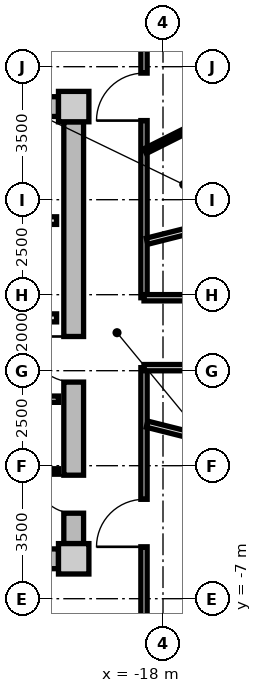
"""IFC4 building model, lengths in metres.
Left out: names, types, materials, properties, quantities, classifications, styles, units other than length and angle.
Written with IfcOpenShell. Run it as: python <this file> out.ifc"""

import sys

from ifc_helpers import new_model, si_unit, direction, frame, frame_2d, origin, origin_2d, place, context, subcontext, project, spatial, rectangle, extrude, source, transform, mapped, element, fill, save


model = new_model("IFC4")
c1 = context("Model", 3, precision=1e-05, world=origin(), true_north=direction((0.0, 1.0)))
c2 = subcontext(c1, "Body", "Model", "MODEL_VIEW")
j1 = project(units=[si_unit("LENGTHUNIT", "METRE"), si_unit("PLANEANGLEUNIT", "RADIAN")], contexts=[c1])
p1 = place(None, origin())
s1 = spatial("IfcSite", under=j1, at=p1, CompositionType="ELEMENT")
p2 = place(p1, origin())
s2 = spatial("IfcBuilding", under=s1, at=p2, CompositionType="ELEMENT")
p3 = place(p2, frame((0.0, 0.0, 210.85)))
s3 = spatial("IfcBuildingStorey", under=s2, at=p3, CompositionType="ELEMENT", Elevation=210.85)
m1 = source(origin(), c2, "Body", "SweptSolid", [
    extrude(rectangle(XDim=0.8, YDim=0.8, at=origin_2d()), origin(), (0.0, 0.0, 1.0), 3.05),
])
for number, where, z_axis, x_axis in (
    (1, (-20.35, -5.95, 0.0), (0.0, 0.0, 1.0), (1.0, 0.0, 0.0)),
    (2, (-20.35, 5.95, 0.0), (0.0, 0.0, 1.0), (1.0, 0.0, 0.0)),
):
    element("IfcColumn", number, at=place(p3, frame(where, z_axis=z_axis, x_axis=x_axis)), inside=s3, PredefinedType="COLUMN", context=c2, shape_type="MappedRepresentation", body=[
        mapped(m1, transform((0.0, 0.0, 0.0), x_axis=(1.0, 0.0, 0.0), y_axis=(0.0, 1.0, 0.0), z_axis=(0.0, 0.0, 1.0), scale=1.0)),
    ])
m2 = source(origin(), c2, "Body", "SweptSolid", [
    extrude(rectangle(XDim=14.5, YDim=0.52, at=frame_2d((7.25, 0.0))), origin(), (0.0, 0.0, 1.0), 2.76),
])
for number, where, z_axis, x_axis in (
    (3, (-35.25, 5.95, 0.0), (0.0, 0.0, 1.0), (1.0, 0.0, 0.0)),
    (4, (-20.75, -5.95, 0.0), (0.0, 0.0, 1.0), (-1.0, 0.0, 0.0)),
):
    element("IfcWall", number, at=place(p3, frame(where, z_axis=z_axis, x_axis=x_axis)), inside=s3, PredefinedType="SHEAR", context=c2, shape_type="MappedRepresentation", body=[
        mapped(m2, transform((0.0, 0.0, 0.0), x_axis=(1.0, 0.0, 0.0), y_axis=(0.0, 1.0, 0.0), z_axis=(0.0, 0.0, 1.0), scale=1.0)),
    ])
m3 = source(origin(), c2, "Body", "SweptSolid", [
    extrude(rectangle(XDim=11.1, YDim=0.52, at=frame_2d((5.55, 0.0))), origin(), (0.0, 0.0, 1.0), 2.76),
])
p4 = place(p3, frame((-20.35, 5.55, 0.0), z_axis=(0.0, 0.0, 1.0), x_axis=(0.0, -1.0, 0.0)))
e5 = element("IfcWall", 5, at=p4, inside=s3, PredefinedType="SHEAR", context=c2, shape_type="MappedRepresentation", body=[
    mapped(m3, transform((0.0, 0.0, 0.0), x_axis=(1.0, 0.0, 0.0), y_axis=(0.0, 1.0, 0.0), z_axis=(0.0, 0.0, 1.0), scale=1.0)),
])
p5 = place(p4, frame((5.65, 0.0, 0.0)))
e6 = element("IfcOpeningElement", 6, at=p5, cuts=e5, PredefinedType="OPENING", context=c2, shape_type="SweptSolid", body=[
    extrude(rectangle(XDim=1.2, YDim=2.15, at=frame_2d((0.6, 1.075))), frame((0.0, 0.27, 0.0), z_axis=(0.0, -1.0, 0.0), x_axis=(1.0, 0.0, 0.0)), (0.0, 0.0, 1.0), 0.54),
])
p6 = place(p4, frame((9.3, 0.0, 0.0)))
e7 = element("IfcOpeningElement", 7, at=p6, cuts=e5, PredefinedType="OPENING", context=c2, shape_type="SweptSolid", body=[
    extrude(rectangle(XDim=1.0, YDim=2.1, at=frame_2d((0.5, 1.05))), frame((0.0, 0.27, 0.0), z_axis=(0.0, -1.0, 0.0), x_axis=(1.0, 0.0, 0.0)), (0.0, 0.0, 1.0), 0.54),
])
m4 = source(origin(), c2, "Body", "SweptSolid", [
    extrude(rectangle(XDim=3.2, YDim=0.2, at=frame_2d((1.6, 0.0))), origin(), (0.0, 0.0, 1.0), 2.745),
])
p7 = place(p3, frame((-24.0, 2.95, 0.0), z_axis=(0.0, 0.0, 1.0), x_axis=(1.0, 0.0, 0.0)))
e8 = element("IfcWall", 8, at=p7, inside=s3, PredefinedType="PARTITIONING", context=c2, shape_type="MappedRepresentation", body=[
    mapped(m4, transform((0.0, 0.0, 0.0), x_axis=(1.0, 0.0, 0.0), y_axis=(0.0, 1.0, 0.0), z_axis=(0.0, 0.0, 1.0), scale=1.0)),
])
m5 = source(origin(), c2, "Body", "SweptSolid", [
    extrude(rectangle(XDim=6.66, YDim=0.21, at=frame_2d((3.33, 0.0))), origin(), (0.0, 0.0, 1.0), 2.745),
])
p8 = place(p3, frame((-27.46, 0.39, 0.0), z_axis=(0.0, 0.0, 1.0), x_axis=(1.0, 0.0, 0.0)))
e9 = element("IfcWall", 9, at=p8, inside=s3, PredefinedType="PARTITIONING", context=c2, shape_type="MappedRepresentation", body=[
    mapped(m5, transform((0.0, 0.0, 0.0), x_axis=(1.0, 0.0, 0.0), y_axis=(0.0, 1.0, 0.0), z_axis=(0.0, 0.0, 1.0), scale=1.0)),
])
p9 = place(p8, frame((1.0, 0.0, 0.0)))
e10 = element("IfcOpeningElement", 10, at=p9, cuts=e9, PredefinedType="OPENING", context=c2, shape_type="SweptSolid", body=[
    extrude(rectangle(XDim=1.2, YDim=2.15, at=frame_2d((0.6, 1.075))), frame((0.0, 0.115, 0.0), z_axis=(0.0, -1.0, 0.0), x_axis=(1.0, 0.0, 0.0)), (0.0, 0.0, 1.0), 0.23),
])
m6 = source(origin(), c2, "Body", "SweptSolid", [
    extrude(rectangle(XDim=2.7, YDim=0.165, at=frame_2d((1.35, 0.0))), origin(), (0.0, 0.0, 1.0), 2.745),
])
p10 = place(p3, frame((-23.45, -1.75, 0.0), z_axis=(0.0, 0.0, 1.0), x_axis=(1.0, 0.0, 0.0)))
e11 = element("IfcWall", 11, at=p10, inside=s3, PredefinedType="PARTITIONING", context=c2, shape_type="MappedRepresentation", body=[
    mapped(m6, transform((0.0, 0.0, 0.0), x_axis=(1.0, 0.0, 0.0), y_axis=(0.0, 1.0, 0.0), z_axis=(0.0, 0.0, 1.0), scale=1.0)),
])
p11 = place(p10, frame((0.85, 0.0, 0.0)))
e12 = element("IfcOpeningElement", 12, at=p11, cuts=e11, PredefinedType="OPENING", context=c2, shape_type="SweptSolid", body=[
    extrude(rectangle(XDim=0.925, YDim=2.1, at=frame_2d((0.462, 1.05))), frame((0.0, 0.093, 0.0), z_axis=(0.0, -1.0, 0.0), x_axis=(1.0, 0.0, 0.0)), (0.0, 0.0, 1.0), 0.185),
])
m7 = source(origin(), c2, "Body", "SweptSolid", [
    extrude(rectangle(XDim=2.7, YDim=0.14, at=frame_2d((1.35, 0.0))), origin(), (0.0, 0.0, 1.0), 2.745),
])
p12 = place(p3, frame((-23.45, -3.65, 0.0), z_axis=(0.0, 0.0, 1.0), x_axis=(1.0, 0.0, 0.0)))
e13 = element("IfcWall", 13, at=p12, inside=s3, PredefinedType="PARTITIONING", context=c2, shape_type="MappedRepresentation", body=[
    mapped(m7, transform((0.0, 0.0, 0.0), x_axis=(1.0, 0.0, 0.0), y_axis=(0.0, 1.0, 0.0), z_axis=(0.0, 0.0, 1.0), scale=1.0)),
])
m8 = source(origin(), c2, "Body", "SweptSolid", [
    extrude(rectangle(XDim=6.88, YDim=0.165, at=frame_2d((3.44, 0.0))), origin(), (0.0, 0.0, 1.0), 2.745),
])
p13 = place(p3, frame((-18.5, 7.8, 0.0), z_axis=(0.0, 0.0, 1.0), x_axis=(0.0, -1.0, 0.0)))
e14 = element("IfcWall", 14, at=p13, inside=s3, PredefinedType="PARTITIONING", context=c2, shape_type="MappedRepresentation", body=[
    mapped(m8, transform((0.0, 0.0, 0.0), x_axis=(1.0, 0.0, 0.0), y_axis=(0.0, 1.0, 0.0), z_axis=(0.0, 0.0, 1.0), scale=1.0)),
])
p14 = place(p13, frame((0.968, 0.0, 0.0)))
e15 = element("IfcOpeningElement", 15, at=p14, cuts=e14, PredefinedType="OPENING", context=c2, shape_type="SweptSolid", body=[
    extrude(rectangle(XDim=1.25, YDim=2.2, at=frame_2d((0.625, 1.1))), frame((0.0, 0.093, 0.0), z_axis=(0.0, -1.0, 0.0), x_axis=(1.0, 0.0, 0.0)), (0.0, 0.0, 1.0), 0.185),
])
p15 = place(p3, frame((-18.5, -0.92, 0.0), z_axis=(0.0, 0.0, 1.0), x_axis=(0.0, -1.0, 0.0)))
e16 = element("IfcWall", 16, at=p15, inside=s3, PredefinedType="PARTITIONING", context=c2, shape_type="MappedRepresentation", body=[
    mapped(m8, transform((0.0, 0.0, 0.0), x_axis=(1.0, 0.0, 0.0), y_axis=(0.0, 1.0, 0.0), z_axis=(0.0, 0.0, 1.0), scale=1.0)),
])
p16 = place(p15, frame((3.464, 0.0, 0.0)))
e17 = element("IfcOpeningElement", 17, at=p16, cuts=e16, PredefinedType="OPENING", context=c2, shape_type="SweptSolid", body=[
    extrude(rectangle(XDim=1.25, YDim=2.2, at=frame_2d((0.625, 1.1))), frame((0.0, 0.093, 0.0), z_axis=(0.0, -1.0, 0.0), x_axis=(1.0, 0.0, 0.0)), (0.0, 0.0, 1.0), 0.185),
])
m9 = source(origin(), c2, "Body", "SweptSolid", [
    extrude(rectangle(XDim=6.157, YDim=0.165, at=frame_2d((3.079, 0.0))), origin(), (0.0, 0.0, 1.0), 2.345),
])
for number, where, z_axis, x_axis in (
    (18, (-18.42, -2.407, 0.0), (0.0, 0.0, 1.0), (0.97, -0.244, 0.0)),
    (19, (-18.42, 2.407, 0.0), (0.0, 0.0, 1.0), (0.97, 0.244, 0.0)),
):
    element("IfcWall", number, at=place(p3, frame(where, z_axis=z_axis, x_axis=x_axis)), inside=s3, PredefinedType="PARTITIONING", context=c2, shape_type="MappedRepresentation", body=[
        mapped(m9, transform((0.0, 0.0, 0.0), x_axis=(1.0, 0.0, 0.0), y_axis=(0.0, 1.0, 0.0), z_axis=(0.0, 0.0, 1.0), scale=1.0)),
    ])
m10 = source(origin(), c2, "Body", "SweptSolid", [
    extrude(rectangle(XDim=2.06, YDim=0.14, at=frame_2d((1.03, 0.0))), origin(), (0.0, 0.0, 1.0), 2.745),
])
p17 = place(p3, frame((-18.47, 4.778, 0.0), z_axis=(0.0, 0.0, 1.0), x_axis=(0.893952568722, 0.448161583444, 0.0)))
e20 = element("IfcWall", 20, at=p17, inside=s3, PredefinedType="PARTITIONING", context=c2, shape_type="MappedRepresentation", body=[
    mapped(m10, transform((0.0, 0.0, 0.0), x_axis=(1.0, 0.0, 0.0), y_axis=(0.0, 1.0, 0.0), z_axis=(0.0, 0.0, 1.0), scale=1.0)),
])
m11 = source(origin(), c2, "Body", "SweptSolid", [
    extrude(rectangle(XDim=37.0, YDim=0.165, at=frame_2d((18.5, 0.0))), origin(), (0.0, 0.0, 1.0), 2.745),
])
p18 = place(p3, frame((-18.5, -0.92, 0.0), z_axis=(0.0, 0.0, 1.0), x_axis=(1.0, 0.0, 0.0)))
e21 = element("IfcWall", 21, at=p18, inside=s3, PredefinedType="PARTITIONING", context=c2, shape_type="MappedRepresentation", body=[
    mapped(m11, transform((0.0, 0.0, 0.0), x_axis=(1.0, 0.0, 0.0), y_axis=(0.0, 1.0, 0.0), z_axis=(0.0, 0.0, 1.0), scale=1.0)),
])
p19 = place(p18, frame((2.662, 0.0, 0.0)))
e22 = element("IfcOpeningElement", 22, at=p19, cuts=e21, PredefinedType="OPENING", context=c2, shape_type="SweptSolid", body=[
    extrude(rectangle(XDim=0.95, YDim=2.1, at=frame_2d((0.475, 1.05))), frame((0.0, 0.093, 0.0), z_axis=(0.0, -1.0, 0.0), x_axis=(1.0, 0.0, 0.0)), (0.0, 0.0, 1.0), 0.185),
])
p20 = place(p18, frame((33.388, 0.0, 0.0)))
e23 = element("IfcOpeningElement", 23, at=p20, cuts=e21, PredefinedType="OPENING", context=c2, shape_type="SweptSolid", body=[
    extrude(rectangle(XDim=0.95, YDim=2.1, at=frame_2d((0.475, 1.05))), frame((0.0, 0.093, 0.0), z_axis=(0.0, -1.0, 0.0), x_axis=(1.0, 0.0, 0.0)), (0.0, 0.0, 1.0), 0.185),
])
p21 = place(p18, frame((9.075, 0.0, 0.0)))
e24 = element("IfcOpeningElement", 24, at=p21, cuts=e21, PredefinedType="OPENING", context=c2, shape_type="SweptSolid", body=[
    extrude(rectangle(XDim=1.25, YDim=2.2, at=frame_2d((0.625, 1.1))), frame((0.0, 0.093, 0.0), z_axis=(0.0, -1.0, 0.0), x_axis=(1.0, 0.0, 0.0)), (0.0, 0.0, 1.0), 0.185),
])
p22 = place(p18, frame((14.875, 0.0, 0.0)))
e25 = element("IfcOpeningElement", 25, at=p22, cuts=e21, PredefinedType="OPENING", context=c2, shape_type="SweptSolid", body=[
    extrude(rectangle(XDim=1.25, YDim=2.2, at=frame_2d((0.625, 1.1))), frame((0.0, 0.093, 0.0), z_axis=(0.0, -1.0, 0.0), x_axis=(1.0, 0.0, 0.0)), (0.0, 0.0, 1.0), 0.185),
])
p23 = place(p18, frame((20.875, 0.0, 0.0)))
e26 = element("IfcOpeningElement", 26, at=p23, cuts=e21, PredefinedType="OPENING", context=c2, shape_type="SweptSolid", body=[
    extrude(rectangle(XDim=1.25, YDim=2.2, at=frame_2d((0.625, 1.1))), frame((0.0, 0.093, 0.0), z_axis=(0.0, -1.0, 0.0), x_axis=(1.0, 0.0, 0.0)), (0.0, 0.0, 1.0), 0.185),
])
p24 = place(p18, frame((26.675, 0.0, 0.0)))
e27 = element("IfcOpeningElement", 27, at=p24, cuts=e21, PredefinedType="OPENING", context=c2, shape_type="SweptSolid", body=[
    extrude(rectangle(XDim=1.25, YDim=2.2, at=frame_2d((0.625, 1.1))), frame((0.0, 0.093, 0.0), z_axis=(0.0, -1.0, 0.0), x_axis=(1.0, 0.0, 0.0)), (0.0, 0.0, 1.0), 0.185),
])
p25 = place(p3, frame((-18.5, 0.92, 0.0), z_axis=(0.0, 0.0, 1.0), x_axis=(1.0, 0.0, 0.0)))
e28 = element("IfcWall", 28, at=p25, inside=s3, PredefinedType="PARTITIONING", context=c2, shape_type="MappedRepresentation", body=[
    mapped(m11, transform((0.0, 0.0, 0.0), x_axis=(1.0, 0.0, 0.0), y_axis=(0.0, 1.0, 0.0), z_axis=(0.0, 0.0, 1.0), scale=1.0)),
])
p26 = place(p25, frame((2.662, 0.0, 0.0)))
e29 = element("IfcOpeningElement", 29, at=p26, cuts=e28, PredefinedType="OPENING", context=c2, shape_type="SweptSolid", body=[
    extrude(rectangle(XDim=0.95, YDim=2.1, at=frame_2d((0.475, 1.05))), frame((0.0, 0.093, 0.0), z_axis=(0.0, -1.0, 0.0), x_axis=(1.0, 0.0, 0.0)), (0.0, 0.0, 1.0), 0.185),
])
p27 = place(p25, frame((33.388, 0.0, 0.0)))
e30 = element("IfcOpeningElement", 30, at=p27, cuts=e28, PredefinedType="OPENING", context=c2, shape_type="SweptSolid", body=[
    extrude(rectangle(XDim=0.95, YDim=2.1, at=frame_2d((0.475, 1.05))), frame((0.0, 0.093, 0.0), z_axis=(0.0, -1.0, 0.0), x_axis=(1.0, 0.0, 0.0)), (0.0, 0.0, 1.0), 0.185),
])
p28 = place(p25, frame((7.64, 0.0, 0.0)))
e31 = element("IfcOpeningElement", 31, at=p28, cuts=e28, PredefinedType="OPENING", context=c2, shape_type="SweptSolid", body=[
    extrude(rectangle(XDim=0.92, YDim=2.1, at=frame_2d((0.46, 1.05))), frame((0.0, 0.093, 0.0), z_axis=(0.0, -1.0, 0.0), x_axis=(1.0, 0.0, 0.0)), (0.0, 0.0, 1.0), 0.185),
])
p29 = place(p25, frame((10.275, 0.0, 0.0)))
e32 = element("IfcOpeningElement", 32, at=p29, cuts=e28, PredefinedType="OPENING", context=c2, shape_type="SweptSolid", body=[
    extrude(rectangle(XDim=1.25, YDim=2.2, at=frame_2d((0.625, 1.1))), frame((0.0, 0.093, 0.0), z_axis=(0.0, -1.0, 0.0), x_axis=(1.0, 0.0, 0.0)), (0.0, 0.0, 1.0), 0.185),
])
p30 = place(p25, frame((14.875, 0.0, 0.0)))
e33 = element("IfcOpeningElement", 33, at=p30, cuts=e28, PredefinedType="OPENING", context=c2, shape_type="SweptSolid", body=[
    extrude(rectangle(XDim=1.25, YDim=2.2, at=frame_2d((0.625, 1.1))), frame((0.0, 0.093, 0.0), z_axis=(0.0, -1.0, 0.0), x_axis=(1.0, 0.0, 0.0)), (0.0, 0.0, 1.0), 0.185),
])
p31 = place(p25, frame((20.875, 0.0, 0.0)))
e34 = element("IfcOpeningElement", 34, at=p31, cuts=e28, PredefinedType="OPENING", context=c2, shape_type="SweptSolid", body=[
    extrude(rectangle(XDim=1.25, YDim=2.2, at=frame_2d((0.625, 1.1))), frame((0.0, 0.093, 0.0), z_axis=(0.0, -1.0, 0.0), x_axis=(1.0, 0.0, 0.0)), (0.0, 0.0, 1.0), 0.185),
])
p32 = place(p25, frame((26.675, 0.0, 0.0)))
e35 = element("IfcOpeningElement", 35, at=p32, cuts=e28, PredefinedType="OPENING", context=c2, shape_type="SweptSolid", body=[
    extrude(rectangle(XDim=1.25, YDim=2.2, at=frame_2d((0.625, 1.1))), frame((0.0, 0.093, 0.0), z_axis=(0.0, -1.0, 0.0), x_axis=(1.0, 0.0, 0.0)), (0.0, 0.0, 1.0), 0.185),
])
m12 = source(origin(), c2, "Body", "SweptSolid", [
    extrude(rectangle(XDim=1.2, YDim=2.15, at=frame_2d((0.6, 1.075))), frame((0.0, 0.025, 0.0), z_axis=(0.0, -1.0, 0.0), x_axis=(1.0, 0.0, 0.0)), (0.0, 0.0, 1.0), 0.05),
])
p33 = place(p5, frame((1.2, 0.0, 0.0), z_axis=(0.0, 0.0, 1.0), x_axis=(-1.0, 0.0, 0.0)))
e36 = element("IfcDoor", 36, at=p33, inside=s3, OperationType="SINGLE_SWING_RIGHT", PredefinedType="DOOR", context=c2, shape_type="MappedRepresentation", body=[
    mapped(m12, transform((0.0, 0.0, 0.0), x_axis=(1.0, 0.0, 0.0), y_axis=(0.0, 1.0, 0.0), z_axis=(0.0, 0.0, 1.0), scale=1.0)),
])
fill(e6, e36)
m13 = source(origin(), c2, "Body", "SweptSolid", [
    extrude(rectangle(XDim=1.0, YDim=2.1, at=frame_2d((0.5, 1.05))), frame((0.0, 0.025, 0.0), z_axis=(0.0, -1.0, 0.0), x_axis=(1.0, 0.0, 0.0)), (0.0, 0.0, 1.0), 0.05),
])
p34 = place(p6, frame((1.0, 0.0, 0.0), z_axis=(0.0, 0.0, 1.0), x_axis=(-1.0, 0.0, 0.0)))
e37 = element("IfcDoor", 37, at=p34, inside=s3, OperationType="SINGLE_SWING_RIGHT", PredefinedType="DOOR", context=c2, shape_type="MappedRepresentation", body=[
    mapped(m13, transform((0.0, 0.0, 0.0), x_axis=(1.0, 0.0, 0.0), y_axis=(0.0, 1.0, 0.0), z_axis=(0.0, 0.0, 1.0), scale=1.0)),
])
fill(e7, e37)
m14 = source(origin(), c2, "Body", "SweptSolid", [
    extrude(rectangle(XDim=1.25, YDim=2.2, at=frame_2d((0.625, 1.1))), frame((0.0, 0.025, 0.0), z_axis=(0.0, -1.0, 0.0), x_axis=(1.0, 0.0, 0.0)), (0.0, 0.0, 1.0), 0.05),
])
p35 = place(p14, frame((1.25, 0.0, 0.0), z_axis=(0.0, 0.0, 1.0), x_axis=(-1.0, 0.0, 0.0)))
e38 = element("IfcDoor", 38, at=p35, inside=s3, OperationType="SINGLE_SWING_LEFT", PredefinedType="DOOR", context=c2, shape_type="MappedRepresentation", body=[
    mapped(m14, transform((0.0, 0.0, 0.0), x_axis=(1.0, 0.0, 0.0), y_axis=(0.0, 1.0, 0.0), z_axis=(0.0, 0.0, 1.0), scale=1.0)),
])
fill(e15, e38)
p36 = place(p16, frame((1.25, 0.0, 0.0), z_axis=(0.0, 0.0, 1.0), x_axis=(-1.0, 0.0, 0.0)))
e39 = element("IfcDoor", 39, at=p36, inside=s3, OperationType="SINGLE_SWING_LEFT", PredefinedType="DOOR", context=c2, shape_type="MappedRepresentation", body=[
    mapped(m14, transform((0.0, 0.0, 0.0), x_axis=(1.0, 0.0, 0.0), y_axis=(0.0, 1.0, 0.0), z_axis=(0.0, 0.0, 1.0), scale=1.0)),
])
fill(e17, e39)
save(model, sys.argv[1])
